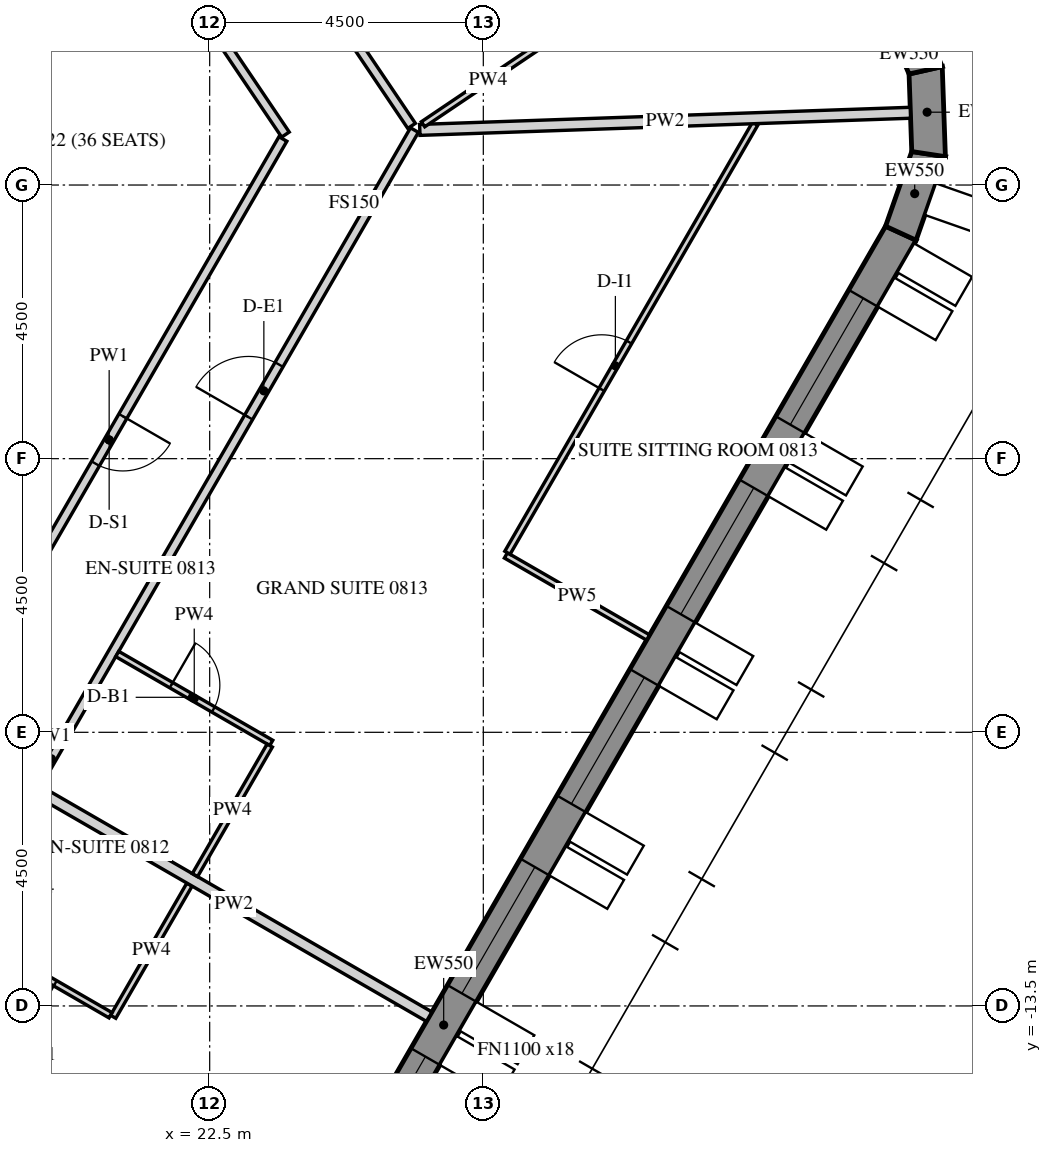
"""IFC4 building model, lengths in metres.
Left out: names, types, materials, properties, quantities, classifications, styles, units other than length and angle.
Written with IfcOpenShell. Run it as: python <this file> out.ifc"""

import sys

from ifc_helpers import new_model, si_unit, direction, frame, frame_2d, origin, place, context, subcontext, project, spatial, polyline, rectangle, outline, extrude, element, fill, save


model = new_model("IFC4")
c1 = context("Model", 3, precision=1e-05, world=origin(), true_north=direction((0.0, 1.0)))
c2 = subcontext(c1, "Body", "Model", "MODEL_VIEW")
j1 = project(units=[si_unit("LENGTHUNIT", "METRE"), si_unit("PLANEANGLEUNIT", "RADIAN")], contexts=[c1])
p1 = place(None, origin())
s1 = spatial("IfcSite", under=j1, at=p1, CompositionType="ELEMENT")
p2 = place(p1, origin())
s2 = spatial("IfcBuilding", under=s1, at=p2, CompositionType="ELEMENT")
p3 = place(p2, frame((0.0, 0.0, 111.6)))
s3 = spatial("IfcBuildingStorey", under=s2, at=p3, CompositionType="ELEMENT", Elevation=111.6)
p4 = place(p3, frame((18.83, -26.835, -0.15), z_axis=(0.0, 0.0, 1.0), x_axis=(0.500003800416, 0.866023209602, 0.0)))
e1 = element("IfcWall", 1, at=p4, inside=s3, PredefinedType="SOLIDWALL", context=c2, shape_type="SweptSolid", body=[
    extrude(outline(polyline([(-0.022, -0.275), (30.097, -0.275), (30.045, 0.275), (0.022, 0.275), (-0.022, -0.275)])), origin(), (0.0, 0.0, 1.0), 3.9),
])
p5 = place(p4, frame((1.236, 0.0, 1.05)))
e2 = element("IfcOpeningElement", 2, at=p5, cuts=e1, PredefinedType="OPENING", context=c2, shape_type="SweptSolid", body=[
    extrude(rectangle(XDim=2.4, YDim=2.4, at=frame_2d((1.2, 1.2))), frame((0.0, 0.285, 0.0), z_axis=(0.0, -1.0, 0.0), x_axis=(1.0, 0.0, 0.0)), (0.0, 0.0, 1.0), 0.57),
])
p6 = place(p4, frame((4.835, 0.0, 1.05)))
e3 = element("IfcOpeningElement", 3, at=p6, cuts=e1, PredefinedType="OPENING", context=c2, shape_type="SweptSolid", body=[
    extrude(rectangle(XDim=2.4, YDim=2.4, at=frame_2d((1.2, 1.2))), frame((0.0, 0.285, 0.0), z_axis=(0.0, -1.0, 0.0), x_axis=(1.0, 0.0, 0.0)), (0.0, 0.0, 1.0), 0.57),
])
p7 = place(p4, frame((8.436, 0.0, 1.05)))
e4 = element("IfcOpeningElement", 4, at=p7, cuts=e1, PredefinedType="OPENING", context=c2, shape_type="SweptSolid", body=[
    extrude(rectangle(XDim=2.4, YDim=2.4, at=frame_2d((1.2, 1.2))), frame((0.0, 0.285, 0.0), z_axis=(0.0, -1.0, 0.0), x_axis=(1.0, 0.0, 0.0)), (0.0, 0.0, 1.0), 0.57),
])
p8 = place(p4, frame((12.035, 0.0, 1.05)))
e5 = element("IfcOpeningElement", 5, at=p8, cuts=e1, PredefinedType="OPENING", context=c2, shape_type="SweptSolid", body=[
    extrude(rectangle(XDim=2.4, YDim=2.4, at=frame_2d((1.2, 1.2))), frame((0.0, 0.285, 0.0), z_axis=(0.0, -1.0, 0.0), x_axis=(1.0, 0.0, 0.0)), (0.0, 0.0, 1.0), 0.57),
])
p9 = place(p4, frame((15.635, 0.0, 1.05)))
e6 = element("IfcOpeningElement", 6, at=p9, cuts=e1, PredefinedType="OPENING", context=c2, shape_type="SweptSolid", body=[
    extrude(rectangle(XDim=2.4, YDim=2.4, at=frame_2d((1.2, 1.2))), frame((0.0, 0.285, 0.0), z_axis=(0.0, -1.0, 0.0), x_axis=(1.0, 0.0, 0.0)), (0.0, 0.0, 1.0), 0.57),
])
p10 = place(p4, frame((19.236, 0.0, 1.05)))
e7 = element("IfcOpeningElement", 7, at=p10, cuts=e1, PredefinedType="OPENING", context=c2, shape_type="SweptSolid", body=[
    extrude(rectangle(XDim=2.4, YDim=2.4, at=frame_2d((1.2, 1.2))), frame((0.0, 0.285, 0.0), z_axis=(0.0, -1.0, 0.0), x_axis=(1.0, 0.0, 0.0)), (0.0, 0.0, 1.0), 0.57),
])
p11 = place(p4, frame((22.835, 0.0, 1.05)))
e8 = element("IfcOpeningElement", 8, at=p11, cuts=e1, PredefinedType="OPENING", context=c2, shape_type="SweptSolid", body=[
    extrude(rectangle(XDim=2.4, YDim=2.4, at=frame_2d((1.2, 1.2))), frame((0.0, 0.285, 0.0), z_axis=(0.0, -1.0, 0.0), x_axis=(1.0, 0.0, 0.0)), (0.0, 0.0, 1.0), 0.57),
])
p12 = place(p4, frame((26.436, 0.0, 1.05)))
e9 = element("IfcOpeningElement", 9, at=p12, cuts=e1, PredefinedType="OPENING", context=c2, shape_type="SweptSolid", body=[
    extrude(rectangle(XDim=2.4, YDim=2.4, at=frame_2d((1.2, 1.2))), frame((0.0, 0.285, 0.0), z_axis=(0.0, -1.0, 0.0), x_axis=(1.0, 0.0, 0.0)), (0.0, 0.0, 1.0), 0.57),
])
p13 = place(p3, frame((33.866, -0.792, -0.15), z_axis=(0.0, 0.0, 1.0), x_axis=(0.33111537203, 0.943590276765, 0.0)))
e10 = element("IfcWall", 10, at=p13, inside=s3, PredefinedType="SOLIDWALL", context=c2, shape_type="SweptSolid", body=[
    extrude(outline(polyline([(-0.026, -0.275), (1.431, -0.275), (1.327, 0.275), (0.026, 0.275), (-0.026, -0.275)])), origin(), (0.0, 0.0, 1.0), 3.9),
])
p14 = place(p3, frame((34.323, 0.509, -0.15), z_axis=(0.0, 0.0, 1.0), x_axis=(-0.034876908462, 0.999391615562, 0.0)))
e11 = element("IfcWall", 11, at=p14, inside=s3, PredefinedType="SOLIDWALL", context=c2, shape_type="SweptSolid", body=[
    extrude(outline(polyline([(-0.052, -0.275), (1.431, -0.275), (1.327, 0.275), (0.052, 0.275), (-0.052, -0.275)])), origin(), (0.0, 0.0, 1.0), 3.9),
])
p15 = place(p3, frame((34.274, 1.887, -0.15), z_axis=(0.0, 0.0, 1.0), x_axis=(-0.396161342798, 0.918180913803, 0.0)))
e12 = element("IfcWall", 12, at=p15, inside=s3, PredefinedType="SOLIDWALL", context=c2, shape_type="SweptSolid", body=[
    extrude(outline(polyline([(-0.052, -0.275), (1.405, -0.275), (1.354, 0.275), (0.052, 0.275), (-0.052, -0.275)])), origin(), (0.0, 0.0, 1.0), 3.9),
])
p16 = place(p3, frame((13.928, -19.775, 0.0), z_axis=(0.0, 0.0, 1.0), x_axis=(0.50000450071, 0.866022805283, 0.0)))
e13 = element("IfcWall", 13, at=p16, inside=s3, PredefinedType="PARTITIONING", context=c2, shape_type="SweptSolid", body=[
    extrude(rectangle(XDim=23.877, YDim=0.15, at=frame_2d((11.938, 0.0))), origin(), (0.0, 0.0, 1.0), 2.988),
])
p17 = place(p16, frame((3.843, 0.0, 0.0)))
e14 = element("IfcOpeningElement", 14, at=p17, cuts=e13, PredefinedType="OPENING", context=c2, shape_type="SweptSolid", body=[
    extrude(rectangle(XDim=1.0, YDim=2.1, at=frame_2d((0.5, 1.05))), frame((0.0, 0.085, 0.0), z_axis=(0.0, -1.0, 0.0), x_axis=(1.0, 0.0, 0.0)), (0.0, 0.0, 1.0), 0.17),
])
p18 = place(p16, frame((18.425, 0.0, 0.0)))
e15 = element("IfcOpeningElement", 15, at=p18, cuts=e13, PredefinedType="OPENING", context=c2, shape_type="SweptSolid", body=[
    extrude(rectangle(XDim=1.0, YDim=2.1, at=frame_2d((0.5, 1.05))), frame((0.0, 0.085, 0.0), z_axis=(0.0, -1.0, 0.0), x_axis=(1.0, 0.0, 0.0)), (0.0, 0.0, 1.0), 0.17),
])
p19 = place(p3, frame((25.821, 0.972, 0.0), z_axis=(0.0, 0.0, 1.0), x_axis=(-0.559192946342, 0.829037543638, 0.0)))
e16 = element("IfcWall", 16, at=p19, inside=s3, PredefinedType="PARTITIONING", context=c2, shape_type="SweptSolid", body=[
    extrude(rectangle(XDim=21.918, YDim=0.15, at=frame_2d((10.959, 0.0))), origin(), (0.0, 0.0, 1.0), 2.988),
])
p20 = place(p19, frame((6.969, 0.0, 0.0)))
e17 = element("IfcOpeningElement", 17, at=p20, cuts=e16, PredefinedType="OPENING", context=c2, shape_type="SweptSolid", body=[
    extrude(rectangle(XDim=1.0, YDim=2.1, at=frame_2d((0.5, 1.05))), frame((0.0, 0.085, 0.0), z_axis=(0.0, -1.0, 0.0), x_axis=(1.0, 0.0, 0.0)), (0.0, 0.0, 1.0), 0.17),
])
p21 = place(p19, frame((15.511, 0.0, 0.0)))
e18 = element("IfcOpeningElement", 18, at=p21, cuts=e16, PredefinedType="OPENING", context=c2, shape_type="SweptSolid", body=[
    extrude(rectangle(XDim=1.0, YDim=2.1, at=frame_2d((0.5, 1.05))), frame((0.0, 0.085, 0.0), z_axis=(0.0, -1.0, 0.0), x_axis=(1.0, 0.0, 0.0)), (0.0, 0.0, 1.0), 0.17),
])
p22 = place(p3, frame((18.14, 9.141, 0.0), z_axis=(0.0, 0.0, 1.0), x_axis=(0.55918799196, -0.829040885389, 0.0)))
e19 = element("IfcWall", 19, at=p22, inside=s3, PredefinedType="PARTITIONING", context=c2, shape_type="SweptSolid", body=[
    extrude(rectangle(XDim=10.025, YDim=0.15, at=frame_2d((5.013, 0.0))), origin(), (0.0, 0.0, 1.0), 2.988),
])
p23 = place(p3, frame((23.704, 0.757, 0.0), z_axis=(0.0, 0.0, 1.0), x_axis=(-0.500010297365, -0.866019458516, 0.0)))
e20 = element("IfcWall", 20, at=p23, inside=s3, PredefinedType="PARTITIONING", context=c2, shape_type="SweptSolid", body=[
    extrude(rectangle(XDim=11.429, YDim=0.15, at=frame_2d((5.714, 0.0))), origin(), (0.0, 0.0, 1.0), 2.988),
])
p24 = place(p23, frame((5.264, 0.0, 0.0)))
e21 = element("IfcOpeningElement", 21, at=p24, cuts=e20, PredefinedType="OPENING", context=c2, shape_type="SweptSolid", body=[
    extrude(rectangle(XDim=0.9, YDim=2.1, at=frame_2d((0.45, 1.05))), frame((0.0, 0.085, 0.0), z_axis=(0.0, -1.0, 0.0), x_axis=(1.0, 0.0, 0.0)), (0.0, 0.0, 1.0), 0.17),
])
p25 = place(p3, frame((22.168, -11.504, 0.0), z_axis=(0.0, 0.0, 1.0), x_axis=(-0.50001992892, -0.866013897511, 0.0)))
e22 = element("IfcWall", 22, at=p25, inside=s3, PredefinedType="PARTITIONING", context=c2, shape_type="SweptSolid", body=[
    extrude(rectangle(XDim=2.51, YDim=0.1, at=frame_2d((1.255, 0.0))), origin(), (0.0, 0.0, 1.0), 2.988),
])
p26 = place(p3, frame((20.87, -13.653, 0.0), z_axis=(0.0, 0.0, 1.0), x_axis=(-0.866039941686, 0.499974818771, 0.0)))
e23 = element("IfcWall", 23, at=p26, inside=s3, PredefinedType="PARTITIONING", context=c2, shape_type="SweptSolid", body=[
    extrude(rectangle(XDim=2.875, YDim=0.1, at=frame_2d((1.438, 0.0))), origin(), (0.0, 0.0, 1.0), 2.988),
])
p27 = place(p26, frame((1.05, 0.0, 0.0)))
e24 = element("IfcOpeningElement", 24, at=p27, cuts=e23, PredefinedType="OPENING", context=c2, shape_type="SweptSolid", body=[
    extrude(rectangle(XDim=0.8, YDim=2.1, at=frame_2d((0.4, 1.05))), frame((0.0, 0.06, 0.0), z_axis=(0.0, -1.0, 0.0), x_axis=(1.0, 0.0, 0.0)), (0.0, 0.0, 1.0), 0.12),
])
p28 = place(p3, frame((26.11, -13.676, 0.0), z_axis=(0.0, 0.0, 1.0), x_axis=(-0.866014745021, 0.500018461065, 0.0)))
e25 = element("IfcWall", 25, at=p28, inside=s3, PredefinedType="PARTITIONING", context=c2, shape_type="SweptSolid", body=[
    extrude(rectangle(XDim=7.425, YDim=0.18, at=frame_2d((3.712, 0.0))), origin(), (0.0, 0.0, 1.0), 2.988),
])
p29 = place(p3, frame((20.98, -7.712, 0.0), z_axis=(0.0, 0.0, 1.0), x_axis=(0.86601045545, -0.500025890382, 0.0)))
e26 = element("IfcWall", 26, at=p29, inside=s3, PredefinedType="PARTITIONING", context=c2, shape_type="SweptSolid", body=[
    extrude(rectangle(XDim=2.925, YDim=0.1, at=frame_2d((1.462, 0.0))), origin(), (0.0, 0.0, 1.0), 2.988),
])
p30 = place(p29, frame((1.025, 0.0, 0.0)))
e27 = element("IfcOpeningElement", 27, at=p30, cuts=e26, PredefinedType="OPENING", context=c2, shape_type="SweptSolid", body=[
    extrude(rectangle(XDim=0.8, YDim=2.1, at=frame_2d((0.4, 1.05))), frame((0.0, 0.06, 0.0), z_axis=(0.0, -1.0, 0.0), x_axis=(1.0, 0.0, 0.0)), (0.0, 0.0, 1.0), 0.12),
])
p31 = place(p3, frame((23.488, -9.218, 0.0), z_axis=(0.0, 0.0, 1.0), x_axis=(-0.500003092839, -0.866023618125, 0.0)))
e28 = element("IfcWall", 28, at=p31, inside=s3, PredefinedType="PARTITIONING", context=c2, shape_type="SweptSolid", body=[
    extrude(rectangle(XDim=2.46, YDim=0.1, at=frame_2d((1.23, 0.0))), origin(), (0.0, 0.0, 1.0), 2.988),
])
p32 = place(p3, frame((29.71, -7.441, 0.0), z_axis=(0.0, 0.0, 1.0), x_axis=(-0.86599734893, 0.500048589285, 0.0)))
e29 = element("IfcWall", 29, at=p32, inside=s3, PredefinedType="PARTITIONING", context=c2, shape_type="SweptSolid", body=[
    extrude(rectangle(XDim=2.7, YDim=0.1, at=frame_2d((1.35, 0.0))), origin(), (0.0, 0.0, 1.0), 2.988),
])
p33 = place(p3, frame((27.397, -6.048, 0.0), z_axis=(0.0, 0.0, 1.0), x_axis=(0.49998354646, 0.866034903032, 0.0)))
e30 = element("IfcWall", 30, at=p33, inside=s3, PredefinedType="PARTITIONING", context=c2, shape_type="SweptSolid", body=[
    extrude(rectangle(XDim=8.148, YDim=0.1, at=frame_2d((4.074, 0.0))), origin(), (0.0, 0.0, 1.0), 2.988),
])
p34 = place(p33, frame((3.1, 0.0, 0.0)))
e31 = element("IfcOpeningElement", 31, at=p34, cuts=e30, PredefinedType="OPENING", context=c2, shape_type="SweptSolid", body=[
    extrude(rectangle(XDim=0.9, YDim=2.1, at=frame_2d((0.45, 1.05))), frame((0.0, 0.06, 0.0), z_axis=(0.0, -1.0, 0.0), x_axis=(1.0, 0.0, 0.0)), (0.0, 0.0, 1.0), 0.12),
])
p35 = place(p3, frame((34.023, 1.188, 0.0), z_axis=(0.0, 0.0, 1.0), x_axis=(-0.999390818315, -0.03489974594, 0.0)))
e32 = element("IfcWall", 32, at=p35, inside=s3, PredefinedType="PARTITIONING", context=c2, shape_type="SweptSolid", body=[
    extrude(rectangle(XDim=8.073, YDim=0.18, at=frame_2d((4.036, 0.0))), origin(), (0.0, 0.0, 1.0), 2.988),
])
p36 = place(p3, frame((28.147, 2.441, 0.0), z_axis=(0.0, 0.0, 1.0), x_axis=(-0.829023136679, -0.559214304941, 0.0)))
e33 = element("IfcWall", 33, at=p36, inside=s3, PredefinedType="PARTITIONING", context=c2, shape_type="SweptSolid", body=[
    extrude(rectangle(XDim=2.579, YDim=0.1, at=frame_2d((1.29, 0.0))), origin(), (0.0, 0.0, 1.0), 2.988),
])
p37 = place(p8, frame((0.0, 0.205, 0.0)))
e34 = element("IfcWindow", 34, at=p37, inside=s3, PartitioningType="DOUBLE_PANEL_VERTICAL", PredefinedType="WINDOW", context=c2, shape_type="SweptSolid", body=[
    extrude(rectangle(XDim=2.4, YDim=2.4, at=frame_2d((1.2, 1.2))), frame((0.0, 0.03, 0.0), z_axis=(0.0, -1.0, 0.0), x_axis=(1.0, 0.0, 0.0)), (0.0, 0.0, 1.0), 0.06),
])
fill(e5, e34)
p38 = place(p9, frame((0.0, 0.205, 0.0)))
e35 = element("IfcWindow", 35, at=p38, inside=s3, PartitioningType="DOUBLE_PANEL_VERTICAL", PredefinedType="WINDOW", context=c2, shape_type="SweptSolid", body=[
    extrude(rectangle(XDim=2.4, YDim=2.4, at=frame_2d((1.2, 1.2))), frame((0.0, 0.03, 0.0), z_axis=(0.0, -1.0, 0.0), x_axis=(1.0, 0.0, 0.0)), (0.0, 0.0, 1.0), 0.06),
])
fill(e6, e35)
p39 = place(p10, frame((0.0, 0.205, 0.0)))
e36 = element("IfcWindow", 36, at=p39, inside=s3, PartitioningType="DOUBLE_PANEL_VERTICAL", PredefinedType="WINDOW", context=c2, shape_type="SweptSolid", body=[
    extrude(rectangle(XDim=2.4, YDim=2.4, at=frame_2d((1.2, 1.2))), frame((0.0, 0.03, 0.0), z_axis=(0.0, -1.0, 0.0), x_axis=(1.0, 0.0, 0.0)), (0.0, 0.0, 1.0), 0.06),
])
fill(e7, e36)
p40 = place(p11, frame((0.0, 0.205, 0.0)))
e37 = element("IfcWindow", 37, at=p40, inside=s3, PartitioningType="DOUBLE_PANEL_VERTICAL", PredefinedType="WINDOW", context=c2, shape_type="SweptSolid", body=[
    extrude(rectangle(XDim=2.4, YDim=2.4, at=frame_2d((1.2, 1.2))), frame((0.0, 0.03, 0.0), z_axis=(0.0, -1.0, 0.0), x_axis=(1.0, 0.0, 0.0)), (0.0, 0.0, 1.0), 0.06),
])
fill(e8, e37)
p41 = place(p12, frame((0.0, 0.205, 0.0)))
e38 = element("IfcWindow", 38, at=p41, inside=s3, PartitioningType="DOUBLE_PANEL_VERTICAL", PredefinedType="WINDOW", context=c2, shape_type="SweptSolid", body=[
    extrude(rectangle(XDim=2.4, YDim=2.4, at=frame_2d((1.2, 1.2))), frame((0.0, 0.03, 0.0), z_axis=(0.0, -1.0, 0.0), x_axis=(1.0, 0.0, 0.0)), (0.0, 0.0, 1.0), 0.06),
])
fill(e9, e38)
p42 = place(p27, origin())
e39 = element("IfcDoor", 39, at=p42, inside=s3, OperationType="SINGLE_SWING_RIGHT", PredefinedType="DOOR", context=c2, shape_type="SweptSolid", body=[
    extrude(rectangle(XDim=0.8, YDim=2.1, at=frame_2d((0.4, 1.05))), frame((0.0, 0.025, 0.0), z_axis=(0.0, -1.0, 0.0), x_axis=(1.0, 0.0, 0.0)), (0.0, 0.0, 1.0), 0.05),
])
fill(e24, e39)
p43 = place(p18, origin())
e40 = element("IfcDoor", 40, at=p43, inside=s3, OperationType="SINGLE_SWING_RIGHT", PredefinedType="DOOR", context=c2, shape_type="SweptSolid", body=[
    extrude(rectangle(XDim=1.0, YDim=2.1, at=frame_2d((0.5, 1.05))), frame((0.0, 0.025, 0.0), z_axis=(0.0, -1.0, 0.0), x_axis=(1.0, 0.0, 0.0)), (0.0, 0.0, 1.0), 0.05),
])
fill(e15, e40)
p44 = place(p30, origin())
e41 = element("IfcDoor", 41, at=p44, inside=s3, OperationType="SINGLE_SWING_RIGHT", PredefinedType="DOOR", context=c2, shape_type="SweptSolid", body=[
    extrude(rectangle(XDim=0.8, YDim=2.1, at=frame_2d((0.4, 1.05))), frame((0.0, 0.025, 0.0), z_axis=(0.0, -1.0, 0.0), x_axis=(1.0, 0.0, 0.0)), (0.0, 0.0, 1.0), 0.05),
])
fill(e27, e41)
p45 = place(p34, origin())
e42 = element("IfcDoor", 42, at=p45, inside=s3, OperationType="SINGLE_SWING_RIGHT", PredefinedType="DOOR", context=c2, shape_type="SweptSolid", body=[
    extrude(rectangle(XDim=0.9, YDim=2.1, at=frame_2d((0.45, 1.05))), frame((0.0, 0.025, 0.0), z_axis=(0.0, -1.0, 0.0), x_axis=(1.0, 0.0, 0.0)), (0.0, 0.0, 1.0), 0.05),
])
fill(e31, e42)
p46 = place(p24, origin())
e43 = element("IfcDoor", 43, at=p46, inside=s3, OperationType="SINGLE_SWING_LEFT", PredefinedType="DOOR", context=c2, shape_type="SweptSolid", body=[
    extrude(rectangle(XDim=0.9, YDim=2.1, at=frame_2d((0.45, 1.05))), frame((0.0, 0.025, 0.0), z_axis=(0.0, -1.0, 0.0), x_axis=(1.0, 0.0, 0.0)), (0.0, 0.0, 1.0), 0.05),
])
fill(e21, e43)
save(model, sys.argv[1])
